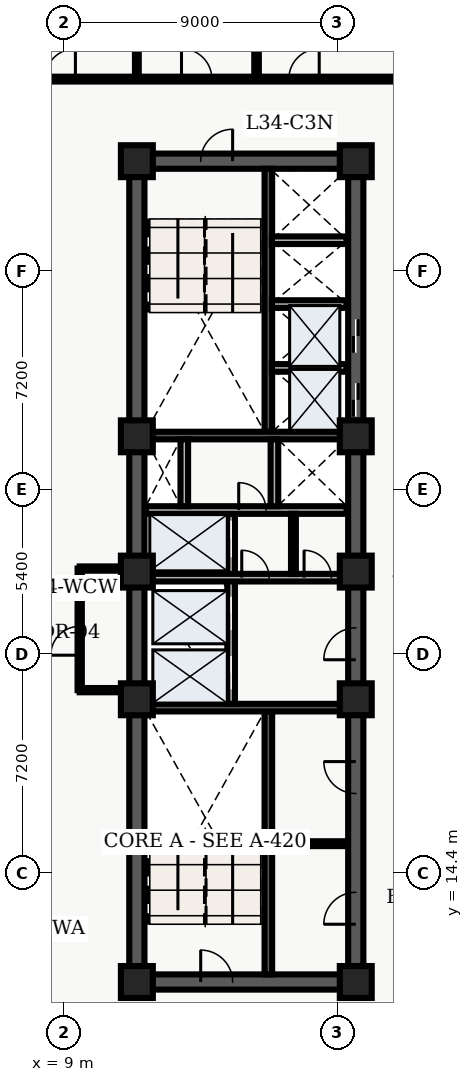
"""IFC4 building model, lengths in metres.
Left out: names, types, materials, properties, quantities, classifications, styles, units other than length and angle.
Written with IfcOpenShell. Run it as: python <this file> out.ifc"""

import sys

from ifc_helpers import new_model, entity, si_unit, converted_unit, direction, frame, origin_with_axes, origin_2d_with_axis, place, context, subcontext, project, spatial, polyline, rectangle, outline, extrude, element, fill, save


model = new_model("IFC4")
c1 = context("Model", 3, precision=1e-05, world=origin_with_axes(), true_north=direction((0.0, 1.0)))
c2 = subcontext(c1, "Body", "Model", "MODEL_VIEW")
j1 = project(units=[si_unit("LENGTHUNIT", "METRE"), converted_unit("PLANEANGLEUNIT", "DEGREE", entity("IfcPlaneAngleMeasure", 0.017), si_unit("PLANEANGLEUNIT", "RADIAN"), dimensions=[0, 0, 0, 0, 0, 0, 0])], contexts=[c1])
p1 = place(None, origin_with_axes())
s1 = spatial("IfcSite", under=j1, at=p1, CompositionType="ELEMENT")
p2 = place(p1, origin_with_axes())
s2 = spatial("IfcBuilding", under=s1, at=p2, CompositionType="ELEMENT")
p3 = place(p2, frame((0.0, 0.0, 140.7), z_axis=(0.0, 0.0, 1.0), x_axis=(1.0, 0.0, 0.0)))
s3 = spatial("IfcBuildingStorey", under=s2, at=p3, CompositionType="ELEMENT", Elevation=140.7)
p4 = place(p3, frame((11.4, 10.8, 0.0), z_axis=(0.0, 0.0, 1.0), x_axis=(0.0, 1.0, 0.0)))
e1 = element("IfcWall", 1, at=p4, inside=s3, PredefinedType="SHEAR", context=c2, shape_type="SweptSolid", body=[
    extrude(outline(polyline([(0.0, -0.25), (27.0, -0.25), (27.0, 0.25), (0.0, 0.25), (0.0, -0.25)])), origin_with_axes(), (0.0, 0.0, 1.0), 3.66),
])
p5 = place(p3, frame((11.4, 10.8, 0.0), z_axis=(0.0, 0.0, 1.0), x_axis=(1.0, 0.0, 0.0)))
e2 = element("IfcWall", 2, at=p5, inside=s3, PredefinedType="SHEAR", context=c2, shape_type="SweptSolid", body=[
    extrude(outline(polyline([(0.0, -0.25), (7.2, -0.25), (7.2, 0.25), (0.0, 0.25), (0.0, -0.25)])), origin_with_axes(), (0.0, 0.0, 1.0), 3.66),
])
p6 = place(p5, frame((2.625, 0.0, 0.0), z_axis=(0.0, 0.0, 1.0), x_axis=(1.0, 0.0, 0.0)))
e3 = element("IfcOpeningElement", 3, at=p6, cuts=e2, PredefinedType="OPENING", context=c2, shape_type="SweptSolid", body=[
    extrude(rectangle(XDim=1.05, YDim=0.52, at=origin_2d_with_axis()), origin_with_axes(), (0.0, 0.0, 1.0), 2.15),
])
p7 = place(p3, frame((11.4, 37.8, 0.0), z_axis=(0.0, 0.0, 1.0), x_axis=(1.0, 0.0, 0.0)))
e4 = element("IfcWall", 4, at=p7, inside=s3, PredefinedType="SHEAR", context=c2, shape_type="SweptSolid", body=[
    extrude(outline(polyline([(0.0, -0.25), (7.2, -0.25), (7.2, 0.25), (0.0, 0.25), (0.0, -0.25)])), origin_with_axes(), (0.0, 0.0, 1.0), 3.66),
])
p8 = place(p7, frame((2.625, 0.0, 0.0), z_axis=(0.0, 0.0, 1.0), x_axis=(1.0, 0.0, 0.0)))
e5 = element("IfcOpeningElement", 5, at=p8, cuts=e4, PredefinedType="OPENING", context=c2, shape_type="SweptSolid", body=[
    extrude(rectangle(XDim=1.05, YDim=0.52, at=origin_2d_with_axis()), origin_with_axes(), (0.0, 0.0, 1.0), 2.15),
])
p9 = place(p3, frame((18.6, 10.8, 0.0), z_axis=(0.0, 0.0, 1.0), x_axis=(0.0, 1.0, 0.0)))
e6 = element("IfcWall", 6, at=p9, inside=s3, PredefinedType="SHEAR", context=c2, shape_type="SweptSolid", body=[
    extrude(outline(polyline([(0.0, -0.25), (13.5, -0.25), (13.5, 0.25), (0.0, 0.25), (0.0, -0.25)])), origin_with_axes(), (0.0, 0.0, 1.0), 3.66),
])
p10 = place(p9, frame((11.125, 0.0, 0.0), z_axis=(0.0, 0.0, 1.0), x_axis=(1.0, 0.0, 0.0)))
e7 = element("IfcOpeningElement", 7, at=p10, cuts=e6, PredefinedType="OPENING", context=c2, shape_type="SweptSolid", body=[
    extrude(rectangle(XDim=1.05, YDim=0.52, at=origin_2d_with_axis()), origin_with_axes(), (0.0, 0.0, 1.0), 2.15),
])
p11 = place(p9, frame((2.425, 0.0, 0.0), z_axis=(0.0, 0.0, 1.0), x_axis=(1.0, 0.0, 0.0)))
e8 = element("IfcOpeningElement", 8, at=p11, cuts=e6, PredefinedType="OPENING", context=c2, shape_type="SweptSolid", body=[
    extrude(rectangle(XDim=1.05, YDim=0.52, at=origin_2d_with_axis()), origin_with_axes(), (0.0, 0.0, 1.0), 2.15),
])
p12 = place(p9, frame((6.725, 0.0, 0.0), z_axis=(0.0, 0.0, 1.0), x_axis=(1.0, 0.0, 0.0)))
e9 = element("IfcOpeningElement", 9, at=p12, cuts=e6, PredefinedType="OPENING", context=c2, shape_type="SweptSolid", body=[
    extrude(rectangle(XDim=1.05, YDim=0.52, at=origin_2d_with_axis()), origin_with_axes(), (0.0, 0.0, 1.0), 2.15),
])
p13 = place(p3, frame((18.6, 24.3, 0.0), z_axis=(0.0, 0.0, 1.0), x_axis=(0.0, 1.0, 0.0)))
e10 = element("IfcWall", 10, at=p13, inside=s3, PredefinedType="SHEAR", context=c2, shape_type="SweptSolid", body=[
    extrude(outline(polyline([(0.0, -0.25), (13.5, -0.25), (13.5, 0.25), (0.0, 0.25), (0.0, -0.25)])), origin_with_axes(), (0.0, 0.0, 1.0), 3.66),
])
p14 = place(p13, frame((5.65, 0.0, 0.0), z_axis=(0.0, 0.0, 1.0), x_axis=(1.0, 0.0, 0.0)))
e11 = element("IfcOpeningElement", 11, at=p14, cuts=e10, PredefinedType="OPENING", context=c2, shape_type="SweptSolid", body=[
    extrude(rectangle(XDim=1.1, YDim=0.52, at=origin_2d_with_axis()), origin_with_axes(), (0.0, 0.0, 1.0), 2.15),
])
p15 = place(p13, frame((7.75, 0.0, 0.0), z_axis=(0.0, 0.0, 1.0), x_axis=(1.0, 0.0, 0.0)))
e12 = element("IfcOpeningElement", 12, at=p15, cuts=e10, PredefinedType="OPENING", context=c2, shape_type="SweptSolid", body=[
    extrude(rectangle(XDim=1.1, YDim=0.52, at=origin_2d_with_axis()), origin_with_axes(), (0.0, 0.0, 1.0), 2.15),
])
p16 = place(p3, frame((15.725, 11.05, 0.0), z_axis=(0.0, 0.0, 1.0), x_axis=(0.0, 1.0, 0.0)))
e13 = element("IfcWall", 13, at=p16, inside=s3, PredefinedType="SHEAR", context=c2, shape_type="SweptSolid", body=[
    extrude(outline(polyline([(0.0, -0.125), (8.65, -0.125), (8.65, 0.125), (0.0, 0.125), (0.0, -0.125)])), origin_with_axes(), (0.0, 0.0, 1.0), 3.66),
])
p17 = place(p3, frame((11.65, 19.825, 0.0), z_axis=(0.0, 0.0, 1.0), x_axis=(1.0, 0.0, 0.0)))
e14 = element("IfcWall", 14, at=p17, inside=s3, PredefinedType="SHEAR", context=c2, shape_type="SweptSolid", body=[
    extrude(outline(polyline([(0.0, -0.125), (6.7, -0.125), (6.7, 0.125), (0.0, 0.125), (0.0, -0.125)])), origin_with_axes(), (0.0, 0.0, 1.0), 3.66),
])
p18 = place(p3, frame((15.725, 28.9, 0.0), z_axis=(0.0, 0.0, 1.0), x_axis=(0.0, 1.0, 0.0)))
e15 = element("IfcWall", 15, at=p18, inside=s3, PredefinedType="SHEAR", context=c2, shape_type="SweptSolid", body=[
    extrude(outline(polyline([(0.0, -0.125), (8.65, -0.125), (8.65, 0.125), (0.0, 0.125), (0.0, -0.125)])), origin_with_axes(), (0.0, 0.0, 1.0), 3.66),
])
p19 = place(p3, frame((11.65, 28.775, 0.0), z_axis=(0.0, 0.0, 1.0), x_axis=(1.0, 0.0, 0.0)))
e16 = element("IfcWall", 16, at=p19, inside=s3, PredefinedType="SHEAR", context=c2, shape_type="SweptSolid", body=[
    extrude(outline(polyline([(0.0, -0.125), (6.7, -0.125), (6.7, 0.125), (0.0, 0.125), (0.0, -0.125)])), origin_with_axes(), (0.0, 0.0, 1.0), 3.66),
])
p20 = place(p3, frame((14.5, 19.95, 0.0), z_axis=(0.0, 0.0, 1.0), x_axis=(0.0, 1.0, 0.0)))
e17 = element("IfcWall", 17, at=p20, inside=s3, PredefinedType="SOLIDWALL", context=c2, shape_type="SweptSolid", body=[
    extrude(outline(polyline([(0.0, -0.125), (6.25, -0.125), (6.25, 0.125), (0.0, 0.125), (0.0, -0.125)])), origin_with_axes(), (0.0, 0.0, 1.0), 2.7),
])
p21 = place(p20, frame((1.025, 0.0, 0.0), z_axis=(0.0, 0.0, 1.0), x_axis=(1.0, 0.0, 0.0)))
e18 = element("IfcOpeningElement", 18, at=p21, cuts=e17, PredefinedType="OPENING", context=c2, shape_type="SweptSolid", body=[
    extrude(rectangle(XDim=1.1, YDim=0.27, at=origin_2d_with_axis()), origin_with_axes(), (0.0, 0.0, 1.0), 2.15),
])
p22 = place(p20, frame((2.975, 0.0, 0.0), z_axis=(0.0, 0.0, 1.0), x_axis=(1.0, 0.0, 0.0)))
e19 = element("IfcOpeningElement", 19, at=p22, cuts=e17, PredefinedType="OPENING", context=c2, shape_type="SweptSolid", body=[
    extrude(rectangle(XDim=1.1, YDim=0.27, at=origin_2d_with_axis()), origin_with_axes(), (0.0, 0.0, 1.0), 2.15),
])
p23 = place(p20, frame((5.425, 0.0, 0.0), z_axis=(0.0, 0.0, 1.0), x_axis=(1.0, 0.0, 0.0)))
e20 = element("IfcOpeningElement", 20, at=p23, cuts=e17, PredefinedType="OPENING", context=c2, shape_type="SweptSolid", body=[
    extrude(rectangle(XDim=1.2, YDim=0.27, at=origin_2d_with_axis()), origin_with_axes(), (0.0, 0.0, 1.0), 2.15),
])
p24 = place(p3, frame((11.7, 24.1, 0.0), z_axis=(0.0, 0.0, 1.0), x_axis=(1.0, 0.0, 0.0)))
e21 = element("IfcWall", 21, at=p24, inside=s3, PredefinedType="SOLIDWALL", context=c2, shape_type="SweptSolid", body=[
    extrude(outline(polyline([(0.0, -0.125), (6.6, -0.125), (6.6, 0.125), (0.0, 0.125), (0.0, -0.125)])), origin_with_axes(), (0.0, 0.0, 1.0), 2.7),
])
p25 = place(p24, frame((3.6, 0.0, 0.0), z_axis=(0.0, 0.0, 1.0), x_axis=(1.0, 0.0, 0.0)))
e22 = element("IfcOpeningElement", 22, at=p25, cuts=e21, PredefinedType="OPENING", context=c2, shape_type="SweptSolid", body=[
    extrude(rectangle(XDim=0.9, YDim=0.27, at=origin_2d_with_axis()), origin_with_axes(), (0.0, 0.0, 1.0), 2.15),
])
p26 = place(p24, frame((5.65, 0.0, 0.0), z_axis=(0.0, 0.0, 1.0), x_axis=(1.0, 0.0, 0.0)))
e23 = element("IfcOpeningElement", 23, at=p26, cuts=e21, PredefinedType="OPENING", context=c2, shape_type="SweptSolid", body=[
    extrude(rectangle(XDim=0.9, YDim=0.27, at=origin_2d_with_axis()), origin_with_axes(), (0.0, 0.0, 1.0), 2.15),
])
p27 = place(p3, frame((11.7, 26.325, 0.0), z_axis=(0.0, 0.0, 1.0), x_axis=(1.0, 0.0, 0.0)))
e24 = element("IfcWall", 24, at=p27, inside=s3, PredefinedType="SOLIDWALL", context=c2, shape_type="SweptSolid", body=[
    extrude(outline(polyline([(0.0, -0.125), (6.6, -0.125), (6.6, 0.125), (0.0, 0.125), (0.0, -0.125)])), origin_with_axes(), (0.0, 0.0, 1.0), 2.7),
])
p28 = place(p27, frame((3.5, 0.0, 0.0), z_axis=(0.0, 0.0, 1.0), x_axis=(1.0, 0.0, 0.0)))
e25 = element("IfcOpeningElement", 25, at=p28, cuts=e24, PredefinedType="OPENING", context=c2, shape_type="SweptSolid", body=[
    extrude(rectangle(XDim=0.9, YDim=0.27, at=origin_2d_with_axis()), origin_with_axes(), (0.0, 0.0, 1.0), 2.15),
])
for number, where, z_axis, x_axis in (
    (26, (12.96, 26.45, 0.0), (0.0, 0.0, 1.0), (0.0, 1.0, 0.0)),
    (27, (15.925, 26.45, 0.0), (0.0, 0.0, 1.0), (0.0, 1.0, 0.0)),
):
    element("IfcWall", number, at=place(p3, frame(where, z_axis=z_axis, x_axis=x_axis)), inside=s3, PredefinedType="SOLIDWALL", context=c2, shape_type="SweptSolid", body=[
        extrude(outline(polyline([(0.0, -0.125), (2.2, -0.125), (2.2, 0.125), (0.0, 0.125), (0.0, -0.125)])), origin_with_axes(), (0.0, 0.0, 1.0), 2.7),
    ])
for number, where, z_axis, x_axis in (
    (28, (11.4, 10.8, 0.0), (0.0, 0.0, 1.0), (1.0, 0.0, 0.0)),
    (29, (11.4, 20.1, 0.0), (0.0, 0.0, 1.0), (1.0, 0.0, 0.0)),
    (30, (11.4, 24.3, 0.0), (0.0, 0.0, 1.0), (1.0, 0.0, 0.0)),
    (31, (11.4, 28.75, 0.0), (0.0, 0.0, 1.0), (1.0, 0.0, 0.0)),
    (32, (11.4, 37.8, 0.0), (0.0, 0.0, 1.0), (1.0, 0.0, 0.0)),
    (33, (18.6, 10.8, 0.0), (0.0, 0.0, 1.0), (1.0, 0.0, 0.0)),
    (34, (18.6, 20.1, 0.0), (0.0, 0.0, 1.0), (1.0, 0.0, 0.0)),
    (35, (18.6, 24.3, 0.0), (0.0, 0.0, 1.0), (1.0, 0.0, 0.0)),
    (36, (18.6, 28.75, 0.0), (0.0, 0.0, 1.0), (1.0, 0.0, 0.0)),
    (37, (18.6, 37.8, 0.0), (0.0, 0.0, 1.0), (1.0, 0.0, 0.0)),
):
    element("IfcColumn", number, at=place(p3, frame(where, z_axis=z_axis, x_axis=x_axis)), inside=s3, PredefinedType="COLUMN", context=c2, shape_type="SweptSolid", body=[
        extrude(rectangle(XDim=1.05, YDim=1.05, at=origin_2d_with_axis()), origin_with_axes(), (0.0, 0.0, 1.0), 3.9),
    ])
p29 = place(p3, frame((16.55, 24.22, 0.0), z_axis=(0.0, 0.0, 1.0), x_axis=(0.0, 1.0, 0.0)))
e38 = element("IfcWall", 38, at=p29, inside=s3, PredefinedType="PARTITIONING", context=c2, shape_type="SweptSolid", body=[
    extrude(outline(polyline([(0.0, -0.08), (1.98, -0.08), (1.98, 0.08), (0.0, 0.08), (0.0, -0.08)])), origin_with_axes(), (0.0, 0.0, 1.0), 2.7),
])
p30 = place(p3, frame((15.84, 15.35, 0.0), z_axis=(0.0, 0.0, 1.0), x_axis=(1.0, 0.0, 0.0)))
e39 = element("IfcWall", 39, at=p30, inside=s3, PredefinedType="PARTITIONING", context=c2, shape_type="SweptSolid", body=[
    extrude(outline(polyline([(0.0, -0.08), (2.46, -0.08), (2.46, 0.08), (0.0, 0.08), (0.0, -0.08)])), origin_with_axes(), (0.0, 0.0, 1.0), 2.7),
])
for number, where, z_axis, x_axis in (
    (40, (15.84, 31.0, 0.0), (0.0, 0.0, 1.0), (1.0, 0.0, 0.0)),
    (41, (15.84, 33.1, 0.0), (0.0, 0.0, 1.0), (1.0, 0.0, 0.0)),
    (42, (15.84, 35.2, 0.0), (0.0, 0.0, 1.0), (1.0, 0.0, 0.0)),
):
    element("IfcWall", number, at=place(p3, frame(where, z_axis=z_axis, x_axis=x_axis)), inside=s3, PredefinedType="SOLIDWALL", context=c2, shape_type="SweptSolid", body=[
        extrude(outline(polyline([(0.0, -0.125), (2.46, -0.125), (2.46, 0.125), (0.0, 0.125), (0.0, -0.125)])), origin_with_axes(), (0.0, 0.0, 1.0), 2.7),
    ])
p31 = place(p3, frame((9.52, 20.4, 0.0), z_axis=(0.0, 0.0, 1.0), x_axis=(0.0, 1.0, 0.0)))
e43 = element("IfcWall", 43, at=p31, inside=s3, PredefinedType="PARTITIONING", context=c2, shape_type="SweptSolid", body=[
    extrude(outline(polyline([(0.0, -0.07), (4.0, -0.07), (4.0, 0.07), (0.0, 0.07), (0.0, -0.07)])), origin_with_axes(), (0.0, 0.0, 1.0), 2.7),
])
p32 = place(p31, frame((1.625, 0.0, 0.0), z_axis=(0.0, 0.0, 1.0), x_axis=(1.0, 0.0, 0.0)))
e44 = element("IfcOpeningElement", 44, at=p32, cuts=e43, PredefinedType="OPENING", context=c2, shape_type="SweptSolid", body=[
    extrude(rectangle(XDim=0.95, YDim=0.16, at=origin_2d_with_axis()), origin_with_axes(), (0.0, 0.0, 1.0), 2.15),
])
for number, where, z_axis, x_axis in (
    (45, (9.52, 20.4, 0.0), (0.0, 0.0, 1.0), (1.0, 0.0, 0.0)),
    (46, (9.52, 24.4, 0.0), (0.0, 0.0, 1.0), (1.0, 0.0, 0.0)),
):
    element("IfcWall", number, at=place(p3, frame(where, z_axis=z_axis, x_axis=x_axis)), inside=s3, PredefinedType="PARTITIONING", context=c2, shape_type="SweptSolid", body=[
        extrude(outline(polyline([(0.0, -0.07), (1.58, -0.07), (1.58, 0.07), (0.0, 0.07), (0.0, -0.07)])), origin_with_axes(), (0.0, 0.0, 1.0), 2.7),
    ])
p33 = place(p3, frame((2.6, 40.5, 0.0), z_axis=(0.0, 0.0, 1.0), x_axis=(1.0, 0.0, 0.0)))
e47 = element("IfcWall", 47, at=p33, inside=s3, PredefinedType="PARTITIONING", context=c2, shape_type="SweptSolid", body=[
    extrude(outline(polyline([(0.0, -0.08), (19.054, -0.08), (19.054, 0.08), (0.0, 0.08), (0.0, -0.08)])), origin_with_axes(), (0.0, 0.0, 1.0), 2.7),
])
p34 = place(p33, frame((1.314, 0.0, 0.0), z_axis=(0.0, 0.0, 1.0), x_axis=(1.0, 0.0, 0.0)))
e48 = element("IfcOpeningElement", 48, at=p34, cuts=e47, PredefinedType="OPENING", context=c2, shape_type="SweptSolid", body=[
    extrude(rectangle(XDim=1.0, YDim=0.18, at=origin_2d_with_axis()), origin_with_axes(), (0.0, 0.0, 1.0), 2.15),
])
p35 = place(p33, frame((6.279, 0.0, 0.0), z_axis=(0.0, 0.0, 1.0), x_axis=(1.0, 0.0, 0.0)))
e49 = element("IfcOpeningElement", 49, at=p35, cuts=e47, PredefinedType="OPENING", context=c2, shape_type="SweptSolid", body=[
    extrude(rectangle(XDim=1.0, YDim=0.18, at=origin_2d_with_axis()), origin_with_axes(), (0.0, 0.0, 1.0), 2.15),
])
p36 = place(p33, frame((10.768, 0.0, 0.0), z_axis=(0.0, 0.0, 1.0), x_axis=(1.0, 0.0, 0.0)))
e50 = element("IfcOpeningElement", 50, at=p36, cuts=e47, PredefinedType="OPENING", context=c2, shape_type="SweptSolid", body=[
    extrude(rectangle(XDim=1.0, YDim=0.18, at=origin_2d_with_axis()), origin_with_axes(), (0.0, 0.0, 1.0), 2.15),
])
p37 = place(p33, frame((14.298, 0.0, 0.0), z_axis=(0.0, 0.0, 1.0), x_axis=(1.0, 0.0, 0.0)))
e51 = element("IfcOpeningElement", 51, at=p37, cuts=e47, PredefinedType="OPENING", context=c2, shape_type="SweptSolid", body=[
    extrude(rectangle(XDim=1.0, YDim=0.18, at=origin_2d_with_axis()), origin_with_axes(), (0.0, 0.0, 1.0), 2.15),
])
p38 = place(p3, frame((11.4, 40.6, 0.0), z_axis=(0.0, 0.0, 1.0), x_axis=(0.0, 1.0, 0.0)))
e52 = element("IfcWall", 52, at=p38, inside=s3, PredefinedType="PARTITIONING", context=c2, shape_type="SweptSolid", body=[
    extrude(outline(polyline([(0.0, -0.062), (7.665, -0.062), (7.665, 0.062), (0.0, 0.062), (0.0, -0.062)])), origin_with_axes(), (0.0, 0.0, 1.0), 2.7),
])
p39 = place(p3, frame((15.337, 40.6, 0.0), z_axis=(0.0, 0.0, 1.0), x_axis=(0.0, 1.0, 0.0)))
e53 = element("IfcWall", 53, at=p39, inside=s3, PredefinedType="PARTITIONING", context=c2, shape_type="SweptSolid", body=[
    extrude(outline(polyline([(0.0, -0.075), (7.665, -0.075), (7.665, 0.075), (0.0, 0.075), (0.0, -0.075)])), origin_with_axes(), (0.0, 0.0, 1.0), 2.7),
])
p40 = place(p13, frame((5.65, 0.0, 0.0), z_axis=(0.0, 0.0, 1.0), x_axis=(1.0, 0.0, 0.0)))
e54 = element("IfcDoor", 54, at=p40, inside=s3, OperationType="SLIDING_TO_LEFT", PredefinedType="DOOR", context=c2, shape_type="SweptSolid", body=[
    extrude(rectangle(XDim=1.1, YDim=0.09, at=origin_2d_with_axis()), origin_with_axes(), (0.0, 0.0, 1.0), 2.15),
])
fill(e11, e54)
p41 = place(p13, frame((7.75, 0.0, 0.0), z_axis=(0.0, 0.0, 1.0), x_axis=(1.0, 0.0, 0.0)))
e55 = element("IfcDoor", 55, at=p41, inside=s3, OperationType="SLIDING_TO_RIGHT", PredefinedType="DOOR", context=c2, shape_type="SweptSolid", body=[
    extrude(rectangle(XDim=1.1, YDim=0.09, at=origin_2d_with_axis()), origin_with_axes(), (0.0, 0.0, 1.0), 2.15),
])
fill(e12, e55)
p42 = place(p20, frame((1.025, 0.0, 0.0), z_axis=(0.0, 0.0, 1.0), x_axis=(1.0, 0.0, 0.0)))
e56 = element("IfcDoor", 56, at=p42, inside=s3, OperationType="SLIDING_TO_LEFT", PredefinedType="DOOR", context=c2, shape_type="SweptSolid", body=[
    extrude(rectangle(XDim=1.1, YDim=0.09, at=origin_2d_with_axis()), origin_with_axes(), (0.0, 0.0, 1.0), 2.15),
])
fill(e18, e56)
p43 = place(p20, frame((2.975, 0.0, 0.0), z_axis=(0.0, 0.0, 1.0), x_axis=(1.0, 0.0, 0.0)))
e57 = element("IfcDoor", 57, at=p43, inside=s3, OperationType="SLIDING_TO_RIGHT", PredefinedType="DOOR", context=c2, shape_type="SweptSolid", body=[
    extrude(rectangle(XDim=1.1, YDim=0.09, at=origin_2d_with_axis()), origin_with_axes(), (0.0, 0.0, 1.0), 2.15),
])
fill(e19, e57)
p44 = place(p20, frame((5.425, 0.0, 0.0), z_axis=(0.0, 0.0, 1.0), x_axis=(1.0, 0.0, 0.0)))
e58 = element("IfcDoor", 58, at=p44, inside=s3, OperationType="DOUBLE_DOOR_SLIDING", PredefinedType="DOOR", context=c2, shape_type="SweptSolid", body=[
    extrude(rectangle(XDim=1.2, YDim=0.09, at=origin_2d_with_axis()), origin_with_axes(), (0.0, 0.0, 1.0), 2.15),
])
fill(e20, e58)
p45 = place(p5, frame((2.625, 0.0, 0.0), z_axis=(0.0, 0.0, 1.0), x_axis=(1.0, 0.0, 0.0)))
e59 = element("IfcDoor", 59, at=p45, inside=s3, OperationType="SINGLE_SWING_LEFT", PredefinedType="DOOR", context=c2, shape_type="SweptSolid", body=[
    extrude(rectangle(XDim=1.05, YDim=0.09, at=origin_2d_with_axis()), origin_with_axes(), (0.0, 0.0, 1.0), 2.15),
])
fill(e3, e59)
p46 = place(p7, frame((2.625, 0.0, 0.0), z_axis=(0.0, 0.0, 1.0), x_axis=(1.0, 0.0, 0.0)))
e60 = element("IfcDoor", 60, at=p46, inside=s3, OperationType="SINGLE_SWING_RIGHT", PredefinedType="DOOR", context=c2, shape_type="SweptSolid", body=[
    extrude(rectangle(XDim=1.05, YDim=0.09, at=origin_2d_with_axis()), origin_with_axes(), (0.0, 0.0, 1.0), 2.15),
])
fill(e5, e60)
p47 = place(p9, frame((11.125, 0.0, 0.0), z_axis=(0.0, 0.0, 1.0), x_axis=(1.0, 0.0, 0.0)))
e61 = element("IfcDoor", 61, at=p47, inside=s3, OperationType="SINGLE_SWING_LEFT", PredefinedType="DOOR", context=c2, shape_type="SweptSolid", body=[
    extrude(rectangle(XDim=1.05, YDim=0.09, at=origin_2d_with_axis()), origin_with_axes(), (0.0, 0.0, 1.0), 2.15),
])
fill(e7, e61)
p48 = place(p24, frame((3.6, 0.0, 0.0), z_axis=(0.0, 0.0, 1.0), x_axis=(1.0, 0.0, 0.0)))
e62 = element("IfcDoor", 62, at=p48, inside=s3, OperationType="SINGLE_SWING_LEFT", PredefinedType="DOOR", context=c2, shape_type="SweptSolid", body=[
    extrude(rectangle(XDim=0.9, YDim=0.09, at=origin_2d_with_axis()), origin_with_axes(), (0.0, 0.0, 1.0), 2.15),
])
fill(e22, e62)
p49 = place(p24, frame((5.65, 0.0, 0.0), z_axis=(0.0, 0.0, 1.0), x_axis=(1.0, 0.0, 0.0)))
e63 = element("IfcDoor", 63, at=p49, inside=s3, OperationType="SINGLE_SWING_LEFT", PredefinedType="DOOR", context=c2, shape_type="SweptSolid", body=[
    extrude(rectangle(XDim=0.9, YDim=0.09, at=origin_2d_with_axis()), origin_with_axes(), (0.0, 0.0, 1.0), 2.15),
])
fill(e23, e63)
p50 = place(p27, frame((3.5, 0.0, 0.0), z_axis=(0.0, 0.0, 1.0), x_axis=(1.0, 0.0, 0.0)))
e64 = element("IfcDoor", 64, at=p50, inside=s3, OperationType="SINGLE_SWING_LEFT", PredefinedType="DOOR", context=c2, shape_type="SweptSolid", body=[
    extrude(rectangle(XDim=0.9, YDim=0.09, at=origin_2d_with_axis()), origin_with_axes(), (0.0, 0.0, 1.0), 2.15),
])
fill(e25, e64)
p51 = place(p9, frame((2.425, 0.0, 0.0), z_axis=(0.0, 0.0, 1.0), x_axis=(1.0, 0.0, 0.0)))
e65 = element("IfcDoor", 65, at=p51, inside=s3, OperationType="SINGLE_SWING_LEFT", PredefinedType="DOOR", context=c2, shape_type="SweptSolid", body=[
    extrude(rectangle(XDim=1.05, YDim=0.09, at=origin_2d_with_axis()), origin_with_axes(), (0.0, 0.0, 1.0), 2.15),
])
fill(e8, e65)
p52 = place(p9, frame((6.725, 0.0, 0.0), z_axis=(0.0, 0.0, 1.0), x_axis=(1.0, 0.0, 0.0)))
e66 = element("IfcDoor", 66, at=p52, inside=s3, OperationType="SINGLE_SWING_RIGHT", PredefinedType="DOOR", context=c2, shape_type="SweptSolid", body=[
    extrude(rectangle(XDim=1.05, YDim=0.09, at=origin_2d_with_axis()), origin_with_axes(), (0.0, 0.0, 1.0), 2.15),
])
fill(e9, e66)
p53 = place(p31, frame((1.625, 0.0, 0.0), z_axis=(0.0, 0.0, 1.0), x_axis=(1.0, 0.0, 0.0)))
e67 = element("IfcDoor", 67, at=p53, inside=s3, OperationType="SINGLE_SWING_LEFT", PredefinedType="DOOR", context=c2, shape_type="SweptSolid", body=[
    extrude(rectangle(XDim=0.95, YDim=0.084, at=origin_2d_with_axis()), origin_with_axes(), (0.0, 0.0, 1.0), 2.15),
])
fill(e44, e67)
p54 = place(p33, frame((6.279, 0.0, 0.0), z_axis=(0.0, 0.0, 1.0), x_axis=(1.0, 0.0, 0.0)))
e68 = element("IfcDoor", 68, at=p54, inside=s3, OperationType="SINGLE_SWING_RIGHT", PredefinedType="DOOR", context=c2, shape_type="SweptSolid", body=[
    extrude(rectangle(XDim=1.0, YDim=0.09, at=origin_2d_with_axis()), origin_with_axes(), (0.0, 0.0, 1.0), 2.15),
])
fill(e49, e68)
p55 = place(p33, frame((10.768, 0.0, 0.0), z_axis=(0.0, 0.0, 1.0), x_axis=(1.0, 0.0, 0.0)))
e69 = element("IfcDoor", 69, at=p55, inside=s3, OperationType="SINGLE_SWING_LEFT", PredefinedType="DOOR", context=c2, shape_type="SweptSolid", body=[
    extrude(rectangle(XDim=1.0, YDim=0.09, at=origin_2d_with_axis()), origin_with_axes(), (0.0, 0.0, 1.0), 2.15),
])
fill(e50, e69)
p56 = place(p33, frame((14.298, 0.0, 0.0), z_axis=(0.0, 0.0, 1.0), x_axis=(1.0, 0.0, 0.0)))
e70 = element("IfcDoor", 70, at=p56, inside=s3, OperationType="SINGLE_SWING_RIGHT", PredefinedType="DOOR", context=c2, shape_type="SweptSolid", body=[
    extrude(rectangle(XDim=1.0, YDim=0.09, at=origin_2d_with_axis()), origin_with_axes(), (0.0, 0.0, 1.0), 2.15),
])
fill(e51, e70)
save(model, sys.argv[1])
